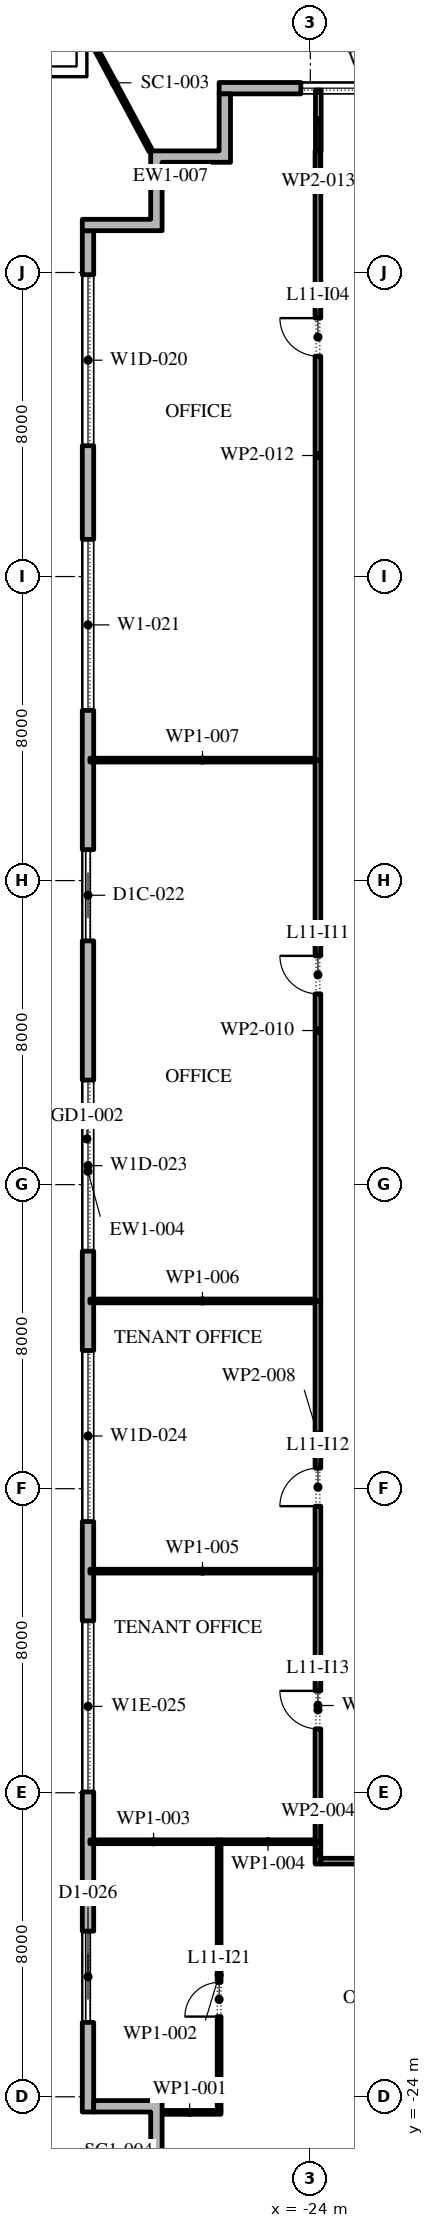
"""IFC4 building model, lengths in metres.
Left out: names, types, materials, properties, quantities, classifications, styles, units other than length and angle.
Written with IfcOpenShell. Run it as: python <this file> out.ifc"""

import sys

from ifc_helpers import new_model, si_unit, direction, frame, frame_2d, origin, place, context, subcontext, project, spatial, polyline, rectangle, outline, extrude, element, fill, save


model = new_model("IFC4")
c1 = context("Model", 3, precision=1e-05, world=origin(), true_north=direction((0.0, 1.0)))
c2 = subcontext(c1, "Body", "Model", "MODEL_VIEW")
j1 = project(units=[si_unit("LENGTHUNIT", "METRE"), si_unit("PLANEANGLEUNIT", "RADIAN")], contexts=[c1])
p1 = place(None, origin())
s1 = spatial("IfcSite", under=j1, at=p1, CompositionType="ELEMENT")
p2 = place(p1, origin())
s2 = spatial("IfcBuilding", under=s1, at=p2, CompositionType="ELEMENT")
p3 = place(p2, frame((0.0, 0.0, 56.4)))
s3 = spatial("IfcBuildingStorey", under=s2, at=p3, CompositionType="ELEMENT", Elevation=56.4)
p4 = place(p3, frame((26.1, 28.85, 0.0), z_axis=(0.0, 0.0, 1.0), x_axis=(-1.0, 0.0, 0.0)))
e1 = element("IfcWall", 1, at=p4, inside=s3, PredefinedType="STANDARD", context=c2, shape_type="SweptSolid", body=[
    extrude(rectangle(XDim=52.5, YDim=0.3, at=frame_2d((26.25, 0.0))), origin(), (0.0, 0.0, 1.0), 4.0),
])
p5 = place(p4, frame((2.0, 0.0, 0.45)))
e2 = element("IfcOpeningElement", 2, at=p5, cuts=e1, PredefinedType="OPENING", context=c2, shape_type="SweptSolid", body=[
    extrude(rectangle(XDim=4.5, YDim=3.0, at=frame_2d((2.25, 1.5))), frame((0.0, 0.16, 0.0), z_axis=(0.0, -1.0, 0.0), x_axis=(1.0, 0.0, 0.0)), (0.0, 0.0, 1.0), 0.32),
])
p6 = place(p4, frame((10.65, 0.0, 0.45)))
e3 = element("IfcOpeningElement", 3, at=p6, cuts=e1, PredefinedType="OPENING", context=c2, shape_type="SweptSolid", body=[
    extrude(rectangle(XDim=4.5, YDim=3.0, at=frame_2d((2.25, 1.5))), frame((0.0, 0.16, 0.0), z_axis=(0.0, -1.0, 0.0), x_axis=(1.0, 0.0, 0.0)), (0.0, 0.0, 1.0), 0.32),
])
p7 = place(p4, frame((20.5, 0.0, 0.0)))
e4 = element("IfcOpeningElement", 4, at=p7, cuts=e1, PredefinedType="OPENING", context=c2, shape_type="SweptSolid", body=[
    extrude(rectangle(XDim=2.4, YDim=3.5, at=frame_2d((1.2, 1.75))), frame((0.0, 0.16, 0.0), z_axis=(0.0, -1.0, 0.0), x_axis=(1.0, 0.0, 0.0)), (0.0, 0.0, 1.0), 0.32),
])
p8 = place(p4, frame((28.25, 0.0, 0.45)))
e5 = element("IfcOpeningElement", 5, at=p8, cuts=e1, PredefinedType="OPENING", context=c2, shape_type="SweptSolid", body=[
    extrude(rectangle(XDim=4.5, YDim=3.0, at=frame_2d((2.25, 1.5))), frame((0.0, 0.16, 0.0), z_axis=(0.0, -1.0, 0.0), x_axis=(1.0, 0.0, 0.0)), (0.0, 0.0, 1.0), 0.32),
])
p9 = place(p4, frame((37.05, 0.0, 0.45)))
e6 = element("IfcOpeningElement", 6, at=p9, cuts=e1, PredefinedType="OPENING", context=c2, shape_type="SweptSolid", body=[
    extrude(rectangle(XDim=4.5, YDim=3.0, at=frame_2d((2.25, 1.5))), frame((0.0, 0.16, 0.0), z_axis=(0.0, -1.0, 0.0), x_axis=(1.0, 0.0, 0.0)), (0.0, 0.0, 1.0), 0.32),
])
p10 = place(p4, frame((45.85, 0.0, 0.45)))
e7 = element("IfcOpeningElement", 7, at=p10, cuts=e1, PredefinedType="OPENING", context=c2, shape_type="SweptSolid", body=[
    extrude(rectangle(XDim=4.5, YDim=3.0, at=frame_2d((2.25, 1.5))), frame((0.0, 0.16, 0.0), z_axis=(0.0, -1.0, 0.0), x_axis=(1.0, 0.0, 0.0)), (0.0, 0.0, 1.0), 0.32),
])
p11 = place(p3, frame((-29.85, 25.1, 0.0), z_axis=(0.0, 0.0, 1.0), x_axis=(0.0, -1.0, 0.0)))
e8 = element("IfcWall", 8, at=p11, inside=s3, PredefinedType="STANDARD", context=c2, shape_type="SweptSolid", body=[
    extrude(rectangle(XDim=49.5, YDim=0.3, at=frame_2d((24.75, 0.0))), origin(), (0.0, 0.0, 1.0), 4.0),
])
p12 = place(p11, frame((1.157, 0.0, 0.45)))
e9 = element("IfcOpeningElement", 9, at=p12, cuts=e8, PredefinedType="OPENING", context=c2, shape_type="SweptSolid", body=[
    extrude(rectangle(XDim=4.5, YDim=2.875, at=frame_2d((2.25, 1.438))), frame((0.0, 0.16, 0.0), z_axis=(0.0, -1.0, 0.0), x_axis=(1.0, 0.0, 0.0)), (0.0, 0.0, 1.0), 0.32),
])
p13 = place(p11, frame((8.121, 0.0, 0.45)))
e10 = element("IfcOpeningElement", 10, at=p13, cuts=e8, PredefinedType="OPENING", context=c2, shape_type="SweptSolid", body=[
    extrude(rectangle(XDim=4.5, YDim=3.05, at=frame_2d((2.25, 1.525))), frame((0.0, 0.16, 0.0), z_axis=(0.0, -1.0, 0.0), x_axis=(1.0, 0.0, 0.0)), (0.0, 0.0, 1.0), 0.32),
])
p14 = place(p11, frame((16.286, 0.0, 0.0)))
e11 = element("IfcOpeningElement", 11, at=p14, cuts=e8, PredefinedType="OPENING", context=c2, shape_type="SweptSolid", body=[
    extrude(rectangle(XDim=2.4, YDim=3.325, at=frame_2d((1.2, 1.663))), frame((0.0, 0.16, 0.0), z_axis=(0.0, -1.0, 0.0), x_axis=(1.0, 0.0, 0.0)), (0.0, 0.0, 1.0), 0.32),
])
p15 = place(p11, frame((22.35, 0.0, 0.45)))
e12 = element("IfcOpeningElement", 12, at=p15, cuts=e8, PredefinedType="OPENING", context=c2, shape_type="SweptSolid", body=[
    extrude(rectangle(XDim=4.5, YDim=2.875, at=frame_2d((2.25, 1.438))), frame((0.0, 0.16, 0.0), z_axis=(0.0, -1.0, 0.0), x_axis=(1.0, 0.0, 0.0)), (0.0, 0.0, 1.0), 0.32),
])
p16 = place(p11, frame((29.464, 0.0, 0.45)))
e13 = element("IfcOpeningElement", 13, at=p16, cuts=e8, PredefinedType="OPENING", context=c2, shape_type="SweptSolid", body=[
    extrude(rectangle(XDim=4.5, YDim=2.875, at=frame_2d((2.25, 1.438))), frame((0.0, 0.16, 0.0), z_axis=(0.0, -1.0, 0.0), x_axis=(1.0, 0.0, 0.0)), (0.0, 0.0, 1.0), 0.32),
])
p17 = place(p11, frame((36.579, 0.0, 0.45)))
e14 = element("IfcOpeningElement", 14, at=p17, cuts=e8, PredefinedType="OPENING", context=c2, shape_type="SweptSolid", body=[
    extrude(rectangle(XDim=4.5, YDim=2.825, at=frame_2d((2.25, 1.413))), frame((0.0, 0.16, 0.0), z_axis=(0.0, -1.0, 0.0), x_axis=(1.0, 0.0, 0.0)), (0.0, 0.0, 1.0), 0.32),
])
p18 = place(p11, frame((44.743, 0.0, 0.0)))
e15 = element("IfcOpeningElement", 15, at=p18, cuts=e8, PredefinedType="OPENING", context=c2, shape_type="SweptSolid", body=[
    extrude(rectangle(XDim=2.4, YDim=3.5, at=frame_2d((1.2, 1.75))), frame((0.0, 0.16, 0.0), z_axis=(0.0, -1.0, 0.0), x_axis=(1.0, 0.0, 0.0)), (0.0, 0.0, 1.0), 0.32),
])
p19 = place(p3, origin())
e16 = element("IfcWall", 16, at=p19, inside=s3, PredefinedType="STANDARD", context=c2, shape_type="SweptSolid", body=[
    extrude(outline(polyline([(-28.2, 25.4), (-28.2, 27.2), (-26.4, 27.2), (-26.4, 28.7), (-26.1, 28.7), (-26.1, 26.9), (-27.9, 26.9), (-27.9, 25.1), (-30.0, 25.1), (-30.0, 25.4), (-28.2, 25.4)])), origin(), (0.0, 0.0, 1.0), 4.0),
])
p20 = place(p3, origin())
e17 = element("IfcWall", 17, at=p20, inside=s3, PredefinedType="STANDARD", context=c2, shape_type="SweptSolid", body=[
    extrude(outline(polyline([(-26.4, -26.2), (-28.2, -26.2), (-28.2, -24.4), (-29.7, -24.4), (-29.7, -24.1), (-27.9, -24.1), (-27.9, -25.9), (-26.1, -25.9), (-26.1, -28.0), (-26.4, -28.0), (-26.4, -26.2)])), origin(), (0.0, 0.0, 1.0), 4.0),
])
p21 = place(p3, frame((-28.2, 27.2, -0.05), z_axis=(0.0, 0.0, 1.0), x_axis=(-0.472846131844, 0.881145013945, 0.0)))
e18 = element("IfcWall", 18, at=p21, inside=s3, PredefinedType="STANDARD", context=c2, shape_type="SweptSolid", body=[
    extrude(rectangle(XDim=4.066, YDim=0.1, at=frame_2d((2.033, 0.0))), origin(), (0.0, 0.0, 1.0), 4.05),
])
p22 = place(p3, frame((-28.0, -24.41, 0.0), z_axis=(0.0, 0.0, 1.0), x_axis=(1.0, 0.0, 0.0)))
e19 = element("IfcWall", 19, at=p22, inside=s3, PredefinedType="PARTITIONING", context=c2, shape_type="SweptSolid", body=[
    extrude(rectangle(XDim=1.65, YDim=0.1, at=frame_2d((0.825, 0.0))), origin(), (0.0, 0.0, 1.0), 4.0),
])
p23 = place(p3, frame((-26.4, -24.36, 0.0), z_axis=(0.0, 0.0, 1.0), x_axis=(0.0, 1.0, 0.0)))
e20 = element("IfcWall", 20, at=p23, inside=s3, PredefinedType="PARTITIONING", context=c2, shape_type="SweptSolid", body=[
    extrude(rectangle(XDim=7.12, YDim=0.1, at=frame_2d((3.56, 0.0))), origin(), (0.0, 0.0, 1.0), 4.0),
])
p24 = place(p23, frame((2.47, 0.0, 0.0)))
e21 = element("IfcOpeningElement", 21, at=p24, cuts=e20, PredefinedType="OPENING", context=c2, shape_type="SweptSolid", body=[
    extrude(rectangle(XDim=0.9, YDim=2.1, at=frame_2d((0.45, 1.05))), frame((0.0, 0.06, 0.0), z_axis=(0.0, -1.0, 0.0), x_axis=(1.0, 0.0, 0.0)), (0.0, 0.0, 1.0), 0.12),
])
p25 = place(p3, frame((-26.45, -17.29, 0.0), z_axis=(0.0, 0.0, 1.0), x_axis=(-1.0, 0.0, 0.0)))
e22 = element("IfcWall", 22, at=p25, inside=s3, PredefinedType="PARTITIONING", context=c2, shape_type="SweptSolid", body=[
    extrude(rectangle(XDim=3.35, YDim=0.1, at=frame_2d((1.675, 0.0))), origin(), (0.0, 0.0, 1.0), 4.0),
])
p26 = place(p3, frame((-23.8, -17.875, 0.0), z_axis=(0.0, 0.0, 1.0), x_axis=(0.0, 1.0, 0.0)))
e23 = element("IfcWall", 23, at=p26, inside=s3, PredefinedType="PARTITIONING", context=c2, shape_type="SweptSolid", body=[
    extrude(rectangle(XDim=0.585, YDim=0.15, at=frame_2d((0.292, 0.0))), origin(), (0.0, 0.0, 1.0), 4.0),
])
p27 = place(p3, frame((-23.875, -17.29, 0.0), z_axis=(0.0, 0.0, 1.0), x_axis=(-1.0, 0.0, 0.0)))
e24 = element("IfcWall", 24, at=p27, inside=s3, PredefinedType="PARTITIONING", context=c2, shape_type="SweptSolid", body=[
    extrude(rectangle(XDim=2.475, YDim=0.1, at=frame_2d((1.238, 0.0))), origin(), (0.0, 0.0, 1.0), 4.0),
])
p28 = place(p3, frame((-23.8, -17.29, 0.0), z_axis=(0.0, 0.0, 1.0), x_axis=(0.0, 1.0, 0.0)))
e25 = element("IfcWall", 25, at=p28, inside=s3, PredefinedType="PARTITIONING", context=c2, shape_type="SweptSolid", body=[
    extrude(rectangle(XDim=7.17, YDim=0.15, at=frame_2d((3.585, 0.0))), origin(), (0.0, 0.0, 1.0), 4.0),
])
p29 = place(p28, frame((2.97, 0.0, 0.0)))
e26 = element("IfcOpeningElement", 26, at=p29, cuts=e25, PredefinedType="OPENING", context=c2, shape_type="SweptSolid", body=[
    extrude(rectangle(XDim=1.0, YDim=2.1, at=frame_2d((0.5, 1.05))), frame((0.0, 0.085, 0.0), z_axis=(0.0, -1.0, 0.0), x_axis=(1.0, 0.0, 0.0)), (0.0, 0.0, 1.0), 0.17),
])
p30 = place(p3, frame((-23.875, -10.17, 0.0), z_axis=(0.0, 0.0, 1.0), x_axis=(-1.0, 0.0, 0.0)))
e27 = element("IfcWall", 27, at=p30, inside=s3, PredefinedType="PARTITIONING", context=c2, shape_type="SweptSolid", body=[
    extrude(rectangle(XDim=5.925, YDim=0.1, at=frame_2d((2.962, 0.0))), origin(), (0.0, 0.0, 1.0), 4.0),
])
p31 = place(p3, frame((-23.8, -10.12, 0.0), z_axis=(0.0, 0.0, 1.0), x_axis=(0.0, 1.0, 0.0)))
e28 = element("IfcWall", 28, at=p31, inside=s3, PredefinedType="PARTITIONING", context=c2, shape_type="SweptSolid", body=[
    extrude(rectangle(XDim=7.06, YDim=0.15, at=frame_2d((3.53, 0.0))), origin(), (0.0, 0.0, 1.0), 4.0),
])
p32 = place(p31, frame((1.66, 0.0, 0.0)))
e29 = element("IfcOpeningElement", 29, at=p32, cuts=e28, PredefinedType="OPENING", context=c2, shape_type="SweptSolid", body=[
    extrude(rectangle(XDim=1.0, YDim=2.1, at=frame_2d((0.5, 1.05))), frame((0.0, 0.085, 0.0), z_axis=(0.0, -1.0, 0.0), x_axis=(1.0, 0.0, 0.0)), (0.0, 0.0, 1.0), 0.17),
])
p33 = place(p3, frame((-23.875, -3.06, 0.0), z_axis=(0.0, 0.0, 1.0), x_axis=(-1.0, 0.0, 0.0)))
e30 = element("IfcWall", 30, at=p33, inside=s3, PredefinedType="PARTITIONING", context=c2, shape_type="SweptSolid", body=[
    extrude(rectangle(XDim=5.925, YDim=0.1, at=frame_2d((2.962, 0.0))), origin(), (0.0, 0.0, 1.0), 4.0),
])
p34 = place(p3, frame((-23.8, -3.06, 0.0), z_axis=(0.0, 0.0, 1.0), x_axis=(0.0, 1.0, 0.0)))
e31 = element("IfcWall", 31, at=p34, inside=s3, PredefinedType="PARTITIONING", context=c2, shape_type="SweptSolid", body=[
    extrude(rectangle(XDim=14.23, YDim=0.15, at=frame_2d((7.115, 0.0))), origin(), (0.0, 0.0, 1.0), 4.0),
])
p35 = place(p34, frame((8.08, 0.0, 0.0)))
e32 = element("IfcOpeningElement", 32, at=p35, cuts=e31, PredefinedType="OPENING", context=c2, shape_type="SweptSolid", body=[
    extrude(rectangle(XDim=1.0, YDim=2.1, at=frame_2d((0.5, 1.05))), frame((0.0, 0.085, 0.0), z_axis=(0.0, -1.0, 0.0), x_axis=(1.0, 0.0, 0.0)), (0.0, 0.0, 1.0), 0.17),
])
p36 = place(p3, frame((-23.875, 11.17, 0.0), z_axis=(0.0, 0.0, 1.0), x_axis=(-1.0, 0.0, 0.0)))
e33 = element("IfcWall", 33, at=p36, inside=s3, PredefinedType="PARTITIONING", context=c2, shape_type="SweptSolid", body=[
    extrude(rectangle(XDim=5.925, YDim=0.1, at=frame_2d((2.962, 0.0))), origin(), (0.0, 0.0, 1.0), 4.0),
])
p37 = place(p3, frame((-23.8, 11.17, 0.0), z_axis=(0.0, 0.0, 1.0), x_axis=(0.0, 1.0, 0.0)))
e34 = element("IfcWall", 34, at=p37, inside=s3, PredefinedType="PARTITIONING", context=c2, shape_type="SweptSolid", body=[
    extrude(rectangle(XDim=16.03, YDim=0.15, at=frame_2d((8.015, 0.0))), origin(), (0.0, 0.0, 1.0), 4.0),
])
p38 = place(p37, frame((10.63, 0.0, 0.0)))
e35 = element("IfcOpeningElement", 35, at=p38, cuts=e34, PredefinedType="OPENING", context=c2, shape_type="SweptSolid", body=[
    extrude(rectangle(XDim=1.0, YDim=2.1, at=frame_2d((0.5, 1.05))), frame((0.0, 0.085, 0.0), z_axis=(0.0, -1.0, 0.0), x_axis=(1.0, 0.0, 0.0)), (0.0, 0.0, 1.0), 0.17),
])
p39 = place(p3, frame((-23.79, 27.2, 0.0), z_axis=(0.0, 0.0, 1.0), x_axis=(0.0, 1.0, 0.0)))
e36 = element("IfcWall", 36, at=p39, inside=s3, PredefinedType="PARTITIONING", context=c2, shape_type="SweptSolid", body=[
    extrude(rectangle(XDim=1.6, YDim=0.15, at=frame_2d((0.8, 0.0))), origin(), (0.0, 0.0, 1.0), 4.0),
])
p40 = place(p3, frame((-17.65, -17.8, 0.0), z_axis=(0.0, 0.0, 1.0), x_axis=(-1.0, 0.0, 0.0)))
e37 = element("IfcWall", 37, at=p40, inside=s3, PredefinedType="PARTITIONING", context=c2, shape_type="SweptSolid", body=[
    extrude(rectangle(XDim=6.075, YDim=0.15, at=frame_2d((3.038, 0.0))), origin(), (0.0, 0.0, 1.0), 4.0),
])
p41 = place(p40, frame((2.5, 0.0, 0.0)))
e38 = element("IfcOpeningElement", 38, at=p41, cuts=e37, PredefinedType="OPENING", context=c2, shape_type="SweptSolid", body=[
    extrude(rectangle(XDim=1.0, YDim=2.1, at=frame_2d((0.5, 1.05))), frame((0.0, 0.085, 0.0), z_axis=(0.0, -1.0, 0.0), x_axis=(1.0, 0.0, 0.0)), (0.0, 0.0, 1.0), 0.17),
])
p42 = place(p10, origin())
e39 = element("IfcWindow", 39, at=p42, inside=s3, PartitioningType="DOUBLE_PANEL_VERTICAL", PredefinedType="WINDOW", context=c2, shape_type="SweptSolid", body=[
    extrude(rectangle(XDim=4.5, YDim=3.0, at=frame_2d((2.25, 1.5))), frame((0.0, 0.03, 0.0), z_axis=(0.0, -1.0, 0.0), x_axis=(1.0, 0.0, 0.0)), (0.0, 0.0, 1.0), 0.06),
])
fill(e7, e39)
p43 = place(p12, origin())
e40 = element("IfcWindow", 40, at=p43, inside=s3, PartitioningType="DOUBLE_PANEL_VERTICAL", PredefinedType="WINDOW", context=c2, shape_type="SweptSolid", body=[
    extrude(rectangle(XDim=4.5, YDim=2.875, at=frame_2d((2.25, 1.438))), frame((0.0, 0.03, 0.0), z_axis=(0.0, -1.0, 0.0), x_axis=(1.0, 0.0, 0.0)), (0.0, 0.0, 1.0), 0.06),
])
fill(e9, e40)
p44 = place(p13, origin())
e41 = element("IfcWindow", 41, at=p44, inside=s3, PartitioningType="DOUBLE_PANEL_VERTICAL", PredefinedType="WINDOW", context=c2, shape_type="SweptSolid", body=[
    extrude(rectangle(XDim=4.5, YDim=3.05, at=frame_2d((2.25, 1.525))), frame((0.0, 0.03, 0.0), z_axis=(0.0, -1.0, 0.0), x_axis=(1.0, 0.0, 0.0)), (0.0, 0.0, 1.0), 0.06),
])
fill(e10, e41)
p45 = place(p14, origin())
e42 = element("IfcDoor", 42, at=p45, inside=s3, OperationType="DOUBLE_DOOR_SLIDING", PredefinedType="DOOR", context=c2, shape_type="SweptSolid", body=[
    extrude(rectangle(XDim=2.4, YDim=3.325, at=frame_2d((1.2, 1.663))), frame((0.0, 0.025, 0.0), z_axis=(0.0, -1.0, 0.0), x_axis=(1.0, 0.0, 0.0)), (0.0, 0.0, 1.0), 0.05),
])
fill(e11, e42)
p46 = place(p15, origin())
e43 = element("IfcWindow", 43, at=p46, inside=s3, PartitioningType="DOUBLE_PANEL_VERTICAL", PredefinedType="WINDOW", context=c2, shape_type="SweptSolid", body=[
    extrude(rectangle(XDim=4.5, YDim=2.875, at=frame_2d((2.25, 1.438))), frame((0.0, 0.03, 0.0), z_axis=(0.0, -1.0, 0.0), x_axis=(1.0, 0.0, 0.0)), (0.0, 0.0, 1.0), 0.06),
])
fill(e12, e43)
p47 = place(p16, origin())
e44 = element("IfcWindow", 44, at=p47, inside=s3, PartitioningType="DOUBLE_PANEL_VERTICAL", PredefinedType="WINDOW", context=c2, shape_type="SweptSolid", body=[
    extrude(rectangle(XDim=4.5, YDim=2.875, at=frame_2d((2.25, 1.438))), frame((0.0, 0.03, 0.0), z_axis=(0.0, -1.0, 0.0), x_axis=(1.0, 0.0, 0.0)), (0.0, 0.0, 1.0), 0.06),
])
fill(e13, e44)
p48 = place(p17, origin())
e45 = element("IfcWindow", 45, at=p48, inside=s3, PartitioningType="DOUBLE_PANEL_VERTICAL", PredefinedType="WINDOW", context=c2, shape_type="SweptSolid", body=[
    extrude(rectangle(XDim=4.5, YDim=2.825, at=frame_2d((2.25, 1.413))), frame((0.0, 0.03, 0.0), z_axis=(0.0, -1.0, 0.0), x_axis=(1.0, 0.0, 0.0)), (0.0, 0.0, 1.0), 0.06),
])
fill(e14, e45)
p49 = place(p18, origin())
e46 = element("IfcDoor", 46, at=p49, inside=s3, OperationType="DOUBLE_DOOR_SLIDING", PredefinedType="DOOR", context=c2, shape_type="SweptSolid", body=[
    extrude(rectangle(XDim=2.4, YDim=3.5, at=frame_2d((1.2, 1.75))), frame((0.0, 0.025, 0.0), z_axis=(0.0, -1.0, 0.0), x_axis=(1.0, 0.0, 0.0)), (0.0, 0.0, 1.0), 0.05),
])
fill(e15, e46)
p50 = place(p38, origin())
e47 = element("IfcDoor", 47, at=p50, inside=s3, OperationType="SINGLE_SWING_LEFT", PredefinedType="DOOR", context=c2, shape_type="SweptSolid", body=[
    extrude(rectangle(XDim=1.0, YDim=2.1, at=frame_2d((0.5, 1.05))), frame((0.0, 0.025, 0.0), z_axis=(0.0, -1.0, 0.0), x_axis=(1.0, 0.0, 0.0)), (0.0, 0.0, 1.0), 0.05),
])
fill(e35, e47)
p51 = place(p35, origin())
e48 = element("IfcDoor", 48, at=p51, inside=s3, OperationType="SINGLE_SWING_LEFT", PredefinedType="DOOR", context=c2, shape_type="SweptSolid", body=[
    extrude(rectangle(XDim=1.0, YDim=2.1, at=frame_2d((0.5, 1.05))), frame((0.0, 0.025, 0.0), z_axis=(0.0, -1.0, 0.0), x_axis=(1.0, 0.0, 0.0)), (0.0, 0.0, 1.0), 0.05),
])
fill(e32, e48)
p52 = place(p32, origin())
e49 = element("IfcDoor", 49, at=p52, inside=s3, OperationType="SINGLE_SWING_RIGHT", PredefinedType="DOOR", context=c2, shape_type="SweptSolid", body=[
    extrude(rectangle(XDim=1.0, YDim=2.1, at=frame_2d((0.5, 1.05))), frame((0.0, 0.025, 0.0), z_axis=(0.0, -1.0, 0.0), x_axis=(1.0, 0.0, 0.0)), (0.0, 0.0, 1.0), 0.05),
])
fill(e29, e49)
p53 = place(p29, origin())
e50 = element("IfcDoor", 50, at=p53, inside=s3, OperationType="SINGLE_SWING_LEFT", PredefinedType="DOOR", context=c2, shape_type="SweptSolid", body=[
    extrude(rectangle(XDim=1.0, YDim=2.1, at=frame_2d((0.5, 1.05))), frame((0.0, 0.025, 0.0), z_axis=(0.0, -1.0, 0.0), x_axis=(1.0, 0.0, 0.0)), (0.0, 0.0, 1.0), 0.05),
])
fill(e26, e50)
p54 = place(p24, origin())
e51 = element("IfcDoor", 51, at=p54, inside=s3, OperationType="SINGLE_SWING_RIGHT", PredefinedType="DOOR", context=c2, shape_type="SweptSolid", body=[
    extrude(rectangle(XDim=0.9, YDim=2.1, at=frame_2d((0.45, 1.05))), frame((0.0, 0.025, 0.0), z_axis=(0.0, -1.0, 0.0), x_axis=(1.0, 0.0, 0.0)), (0.0, 0.0, 1.0), 0.05),
])
fill(e21, e51)
save(model, sys.argv[1])
